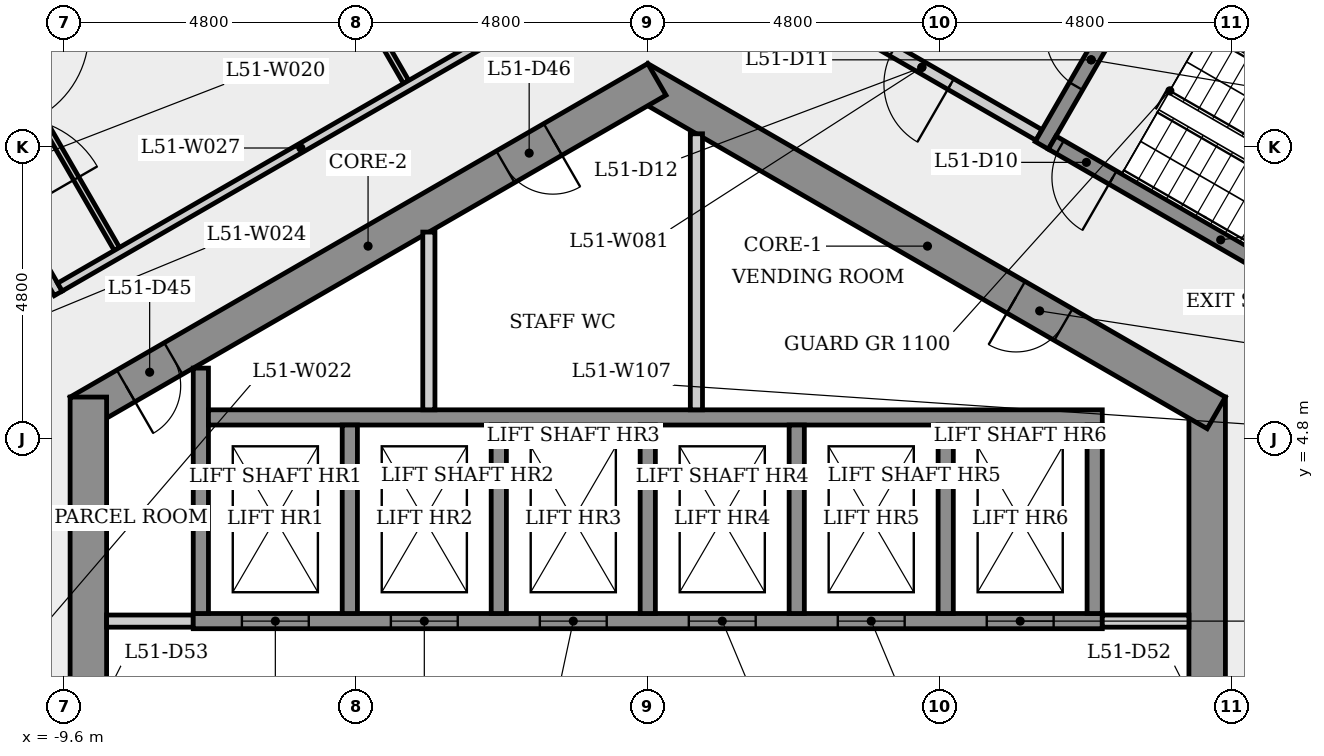
"""IFC4 building model, lengths in metres.
Left out: names, types, materials, properties, quantities, classifications, styles, units other than length and angle.
Written with IfcOpenShell. Run it as: python <this file> out.ifc"""

import sys

from ifc_helpers import new_model, si_unit, direction, frame, frame_2d, origin, place, context, subcontext, project, spatial, rectangle, extrude, element, fill, save


model = new_model("IFC4")
c1 = context("Model", 3, precision=1e-05, world=origin(), true_north=direction((0.0, 1.0)))
c2 = subcontext(c1, "Body", "Model", "MODEL_VIEW")
j1 = project(units=[si_unit("LENGTHUNIT", "METRE"), si_unit("PLANEANGLEUNIT", "RADIAN")], contexts=[c1])
p1 = place(None, origin())
s1 = spatial("IfcSite", under=j1, at=p1, CompositionType="ELEMENT")
p2 = place(p1, origin())
s2 = spatial("IfcBuilding", under=s1, at=p2, CompositionType="ELEMENT")
p3 = place(p2, frame((0.0, 0.0, 190.7)))
s3 = spatial("IfcBuildingStorey", under=s2, at=p3, CompositionType="ELEMENT", Elevation=190.7)
p4 = place(p3, frame((9.2, -5.485, 0.0), z_axis=(0.0, 0.0, 1.0), x_axis=(0.0, 1.0, 0.0)))
e1 = element("IfcWall", 1, at=p4, inside=s3, PredefinedType="SHEAR", context=c2, shape_type="SweptSolid", body=[
    extrude(rectangle(XDim=10.97, YDim=0.6, at=frame_2d((5.485, 0.0))), origin(), (0.0, 0.0, 1.0), 4.0),
])
p5 = place(p4, frame((4.685, 0.0, 0.0)))
e2 = element("IfcOpeningElement", 2, at=p5, cuts=e1, PredefinedType="OPENING", context=c2, shape_type="SweptSolid", body=[
    extrude(rectangle(XDim=1.6, YDim=2.1, at=frame_2d((0.8, 1.05))), frame((0.0, 0.31, 0.0), z_axis=(0.0, -1.0, 0.0), x_axis=(1.0, 0.0, 0.0)), (0.0, 0.0, 1.0), 0.62),
])
p6 = place(p3, frame((9.35, 5.225, 0.0), z_axis=(0.0, 0.0, 1.0), x_axis=(-0.866023993627, 0.500002442456, 0.0)))
e3 = element("IfcWall", 3, at=p6, inside=s3, PredefinedType="SHEAR", context=c2, shape_type="SweptSolid", body=[
    extrude(rectangle(XDim=10.97, YDim=0.6, at=frame_2d((5.485, 0.0))), origin(), (0.0, 0.0, 1.0), 4.0),
])
p7 = place(p6, frame((2.904, 0.0, 0.0)))
e4 = element("IfcOpeningElement", 4, at=p7, cuts=e3, PredefinedType="OPENING", context=c2, shape_type="SweptSolid", body=[
    extrude(rectangle(XDim=0.9, YDim=2.1, at=frame_2d((0.45, 1.05))), frame((0.0, 0.31, 0.0), z_axis=(0.0, -1.0, 0.0), x_axis=(1.0, 0.0, 0.0)), (0.0, 0.0, 1.0), 0.62),
])
p8 = place(p3, frame((0.15, 10.71, 0.0), z_axis=(0.0, 0.0, 1.0), x_axis=(-0.866023993627, -0.500002442456, 0.0)))
e5 = element("IfcWall", 5, at=p8, inside=s3, PredefinedType="SHEAR", context=c2, shape_type="SweptSolid", body=[
    extrude(rectangle(XDim=10.97, YDim=0.6, at=frame_2d((5.485, 0.0))), origin(), (0.0, 0.0, 1.0), 4.0),
])
p9 = place(p8, frame((9.182, 0.0, 0.0)))
e6 = element("IfcOpeningElement", 6, at=p9, cuts=e5, PredefinedType="OPENING", context=c2, shape_type="SweptSolid", body=[
    extrude(rectangle(XDim=0.9, YDim=2.1, at=frame_2d((0.45, 1.05))), frame((0.0, 0.31, 0.0), z_axis=(0.0, -1.0, 0.0), x_axis=(1.0, 0.0, 0.0)), (0.0, 0.0, 1.0), 0.62),
])
p10 = place(p8, frame((1.975, 0.0, 0.0)))
e7 = element("IfcOpeningElement", 7, at=p10, cuts=e5, PredefinedType="OPENING", context=c2, shape_type="SweptSolid", body=[
    extrude(rectangle(XDim=0.9, YDim=2.1, at=frame_2d((0.45, 1.05))), frame((0.0, 0.31, 0.0), z_axis=(0.0, -1.0, 0.0), x_axis=(1.0, 0.0, 0.0)), (0.0, 0.0, 1.0), 0.62),
])
p11 = place(p3, frame((-9.2, 5.485, 0.0), z_axis=(0.0, 0.0, 1.0), x_axis=(0.0, -1.0, 0.0)))
e8 = element("IfcWall", 8, at=p11, inside=s3, PredefinedType="SHEAR", context=c2, shape_type="SweptSolid", body=[
    extrude(rectangle(XDim=10.97, YDim=0.6, at=frame_2d((5.485, 0.0))), origin(), (0.0, 0.0, 1.0), 4.0),
])
p12 = place(p11, frame((8.516, 0.0, 0.0)))
e9 = element("IfcOpeningElement", 9, at=p12, cuts=e8, PredefinedType="OPENING", context=c2, shape_type="SweptSolid", body=[
    extrude(rectangle(XDim=0.9, YDim=2.1, at=frame_2d((0.45, 1.05))), frame((0.0, 0.31, 0.0), z_axis=(0.0, -1.0, 0.0), x_axis=(1.0, 0.0, 0.0)), (0.0, 0.0, 1.0), 0.62),
])
p13 = place(p11, frame((4.685, 0.0, 0.0)))
e10 = element("IfcOpeningElement", 10, at=p13, cuts=e8, PredefinedType="OPENING", context=c2, shape_type="SweptSolid", body=[
    extrude(rectangle(XDim=1.6, YDim=2.1, at=frame_2d((0.8, 1.05))), frame((0.0, 0.31, 0.0), z_axis=(0.0, -1.0, 0.0), x_axis=(1.0, 0.0, 0.0)), (0.0, 0.0, 1.0), 0.62),
])
p14 = place(p3, frame((-20.11, 27.629, 0.0), z_axis=(0.0, 0.0, 1.0), x_axis=(0.499998569178, -0.866026229868, 0.0)))
e11 = element("IfcWall", 11, at=p14, inside=s3, PredefinedType="PARTITIONING", context=c2, shape_type="SweptSolid", body=[
    extrude(rectangle(XDim=22.757, YDim=0.1, at=frame_2d((11.379, 0.0))), origin(), (0.0, 0.0, 1.0), 3.6),
])
p15 = place(p14, frame((18.635, 0.0, 0.0)))
e12 = element("IfcOpeningElement", 12, at=p15, cuts=e11, PredefinedType="OPENING", context=c2, shape_type="SweptSolid", body=[
    extrude(rectangle(XDim=1.6, YDim=2.1, at=frame_2d((0.8, 1.05))), frame((0.0, 0.06, 0.0), z_axis=(0.0, -1.0, 0.0), x_axis=(1.0, 0.0, 0.0)), (0.0, 0.0, 1.0), 0.12),
])
p16 = place(p14, frame((3.535, 0.0, 0.0)))
e13 = element("IfcOpeningElement", 13, at=p16, cuts=e11, PredefinedType="OPENING", context=c2, shape_type="SweptSolid", body=[
    extrude(rectangle(XDim=1.6, YDim=2.1, at=frame_2d((0.8, 1.05))), frame((0.0, 0.06, 0.0), z_axis=(0.0, -1.0, 0.0), x_axis=(1.0, 0.0, 0.0)), (0.0, 0.0, 1.0), 0.12),
])
p17 = place(p3, frame((-11.945, 11.087, 0.0), z_axis=(0.0, 0.0, 1.0), x_axis=(0.499962028372, -0.866047325604, 0.0)))
e14 = element("IfcWall", 14, at=p17, inside=s3, PredefinedType="PARTITIONING", context=c2, shape_type="SweptSolid", body=[
    extrude(rectangle(XDim=4.499, YDim=0.15, at=frame_2d((2.25, 0.0))), origin(), (0.0, 0.0, 1.0), 3.6),
])
p18 = place(p17, frame((1.412, 0.0, 0.0)))
e15 = element("IfcOpeningElement", 15, at=p18, cuts=e14, PredefinedType="OPENING", context=c2, shape_type="SweptSolid", body=[
    extrude(rectangle(XDim=1.6, YDim=2.1, at=frame_2d((0.8, 1.05))), frame((0.0, 0.085, 0.0), z_axis=(0.0, -1.0, 0.0), x_axis=(1.0, 0.0, 0.0)), (0.0, 0.0, 1.0), 0.17),
])
p19 = place(p3, frame((-15.353, 30.375, 0.0), z_axis=(0.0, 0.0, 1.0), x_axis=(0.499998569178, -0.866026229868, 0.0)))
e16 = element("IfcWall", 16, at=p19, inside=s3, PredefinedType="PARTITIONING", context=c2, shape_type="SweptSolid", body=[
    extrude(rectangle(XDim=22.757, YDim=0.1, at=frame_2d((11.379, 0.0))), origin(), (0.0, 0.0, 1.0), 3.6),
])
p20 = place(p19, frame((11.219, 0.0, 0.0)))
e17 = element("IfcOpeningElement", 17, at=p20, cuts=e16, PredefinedType="OPENING", context=c2, shape_type="SweptSolid", body=[
    extrude(rectangle(XDim=1.6, YDim=2.1, at=frame_2d((0.8, 1.05))), frame((0.0, 0.06, 0.0), z_axis=(0.0, -1.0, 0.0), x_axis=(1.0, 0.0, 0.0)), (0.0, 0.0, 1.0), 0.12),
])
p21 = place(p3, frame((-9.668, 7.293, 0.0), z_axis=(0.0, 0.0, 1.0), x_axis=(0.866028335764, 0.499994921628, 0.0)))
e18 = element("IfcWall", 18, at=p21, inside=s3, PredefinedType="PARTITIONING", context=c2, shape_type="SweptSolid", body=[
    extrude(rectangle(XDim=9.152, YDim=0.15, at=frame_2d((4.576, 0.0))), origin(), (0.0, 0.0, 1.0), 3.6),
])
p22 = place(p3, frame((-8.9, 1.8, 0.0), z_axis=(0.0, 0.0, 1.0), x_axis=(1.0, 0.0, 0.0)))
e19 = element("IfcWall", 19, at=p22, inside=s3, PredefinedType="PARTITIONING", context=c2, shape_type="SweptSolid", body=[
    extrude(rectangle(XDim=1.425, YDim=0.2, at=frame_2d((0.712, 0.0))), origin(), (0.0, 0.0, 1.0), 3.6),
])
p23 = place(p3, frame((-7.475, 1.8, 0.0), z_axis=(0.0, 0.0, 1.0), x_axis=(1.0, 0.0, 0.0)))
e20 = element("IfcWall", 20, at=p23, inside=s3, PredefinedType="SHEAR", context=c2, shape_type="SweptSolid", body=[
    extrude(rectangle(XDim=14.95, YDim=0.25, at=frame_2d((7.475, 0.0))), origin(), (0.0, 0.0, 1.0), 3.6),
])
p24 = place(p23, frame((0.8, 0.0, 0.0)))
e21 = element("IfcOpeningElement", 21, at=p24, cuts=e20, PredefinedType="OPENING", context=c2, shape_type="SweptSolid", body=[
    extrude(rectangle(XDim=1.1, YDim=2.1, at=frame_2d((0.55, 1.05))), frame((0.0, 0.135, 0.0), z_axis=(0.0, -1.0, 0.0), x_axis=(1.0, 0.0, 0.0)), (0.0, 0.0, 1.0), 0.27),
])
p25 = place(p23, frame((3.25, 0.0, 0.0)))
e22 = element("IfcOpeningElement", 22, at=p25, cuts=e20, PredefinedType="OPENING", context=c2, shape_type="SweptSolid", body=[
    extrude(rectangle(XDim=1.1, YDim=2.1, at=frame_2d((0.55, 1.05))), frame((0.0, 0.135, 0.0), z_axis=(0.0, -1.0, 0.0), x_axis=(1.0, 0.0, 0.0)), (0.0, 0.0, 1.0), 0.27),
])
p26 = place(p23, frame((5.7, 0.0, 0.0)))
e23 = element("IfcOpeningElement", 23, at=p26, cuts=e20, PredefinedType="OPENING", context=c2, shape_type="SweptSolid", body=[
    extrude(rectangle(XDim=1.1, YDim=2.1, at=frame_2d((0.55, 1.05))), frame((0.0, 0.135, 0.0), z_axis=(0.0, -1.0, 0.0), x_axis=(1.0, 0.0, 0.0)), (0.0, 0.0, 1.0), 0.27),
])
p27 = place(p23, frame((8.15, 0.0, 0.0)))
e24 = element("IfcOpeningElement", 24, at=p27, cuts=e20, PredefinedType="OPENING", context=c2, shape_type="SweptSolid", body=[
    extrude(rectangle(XDim=1.1, YDim=2.1, at=frame_2d((0.55, 1.05))), frame((0.0, 0.135, 0.0), z_axis=(0.0, -1.0, 0.0), x_axis=(1.0, 0.0, 0.0)), (0.0, 0.0, 1.0), 0.27),
])
p28 = place(p23, frame((10.6, 0.0, 0.0)))
e25 = element("IfcOpeningElement", 25, at=p28, cuts=e20, PredefinedType="OPENING", context=c2, shape_type="SweptSolid", body=[
    extrude(rectangle(XDim=1.1, YDim=2.1, at=frame_2d((0.55, 1.05))), frame((0.0, 0.135, 0.0), z_axis=(0.0, -1.0, 0.0), x_axis=(1.0, 0.0, 0.0)), (0.0, 0.0, 1.0), 0.27),
])
p29 = place(p23, frame((13.05, 0.0, 0.0)))
e26 = element("IfcOpeningElement", 26, at=p29, cuts=e20, PredefinedType="OPENING", context=c2, shape_type="SweptSolid", body=[
    extrude(rectangle(XDim=1.1, YDim=2.1, at=frame_2d((0.55, 1.05))), frame((0.0, 0.135, 0.0), z_axis=(0.0, -1.0, 0.0), x_axis=(1.0, 0.0, 0.0)), (0.0, 0.0, 1.0), 0.27),
])
p30 = place(p3, frame((-7.35, 1.925, 0.0), z_axis=(0.0, 0.0, 1.0), x_axis=(0.0, 1.0, 0.0)))
e27 = element("IfcWall", 27, at=p30, inside=s3, PredefinedType="SHEAR", context=c2, shape_type="SweptSolid", body=[
    extrude(rectangle(XDim=4.036, YDim=0.25, at=frame_2d((2.018, 0.0))), origin(), (0.0, 0.0, 1.0), 3.6),
])
p31 = place(p3, frame((-7.225, 5.15, 0.0), z_axis=(0.0, 0.0, 1.0), x_axis=(1.0, 0.0, 0.0)))
e28 = element("IfcWall", 28, at=p31, inside=s3, PredefinedType="SHEAR", context=c2, shape_type="SweptSolid", body=[
    extrude(rectangle(XDim=14.7, YDim=0.25, at=frame_2d((7.35, 0.0))), origin(), (0.0, 0.0, 1.0), 3.6),
])
p32 = place(p3, frame((-4.9, 5.025, 0.0), z_axis=(0.0, 0.0, 1.0), x_axis=(0.0, -1.0, 0.0)))
e29 = element("IfcWall", 29, at=p32, inside=s3, PredefinedType="SHEAR", context=c2, shape_type="SweptSolid", body=[
    extrude(rectangle(XDim=3.1, YDim=0.25, at=frame_2d((1.55, 0.0))), origin(), (0.0, 0.0, 1.0), 4.0),
])
p33 = place(p3, frame((-3.6, 8.198, 0.0), z_axis=(0.0, 0.0, 1.0), x_axis=(0.0, -1.0, 0.0)))
e30 = element("IfcWall", 30, at=p33, inside=s3, PredefinedType="PARTITIONING", context=c2, shape_type="SweptSolid", body=[
    extrude(rectangle(XDim=2.924, YDim=0.2, at=frame_2d((1.462, 0.0))), origin(), (0.0, 0.0, 1.0), 3.6),
])
for number, where, z_axis, x_axis in (
    (31, (-2.45, 5.025, 0.0), (0.0, 0.0, 1.0), (0.0, -1.0, 0.0)),
    (32, (0.0, 5.025, 0.0), (0.0, 0.0, 1.0), (0.0, -1.0, 0.0)),
):
    element("IfcWall", number, at=place(p3, frame(where, z_axis=z_axis, x_axis=x_axis)), inside=s3, PredefinedType="SHEAR", context=c2, shape_type="SweptSolid", body=[
        extrude(rectangle(XDim=3.1, YDim=0.25, at=frame_2d((1.55, 0.0))), origin(), (0.0, 0.0, 1.0), 4.0),
    ])
p34 = place(p3, frame((0.8, 9.815, 0.0), z_axis=(0.0, 0.0, 1.0), x_axis=(0.0, -1.0, 0.0)))
e33 = element("IfcWall", 33, at=p34, inside=s3, PredefinedType="PARTITIONING", context=c2, shape_type="SweptSolid", body=[
    extrude(rectangle(XDim=4.54, YDim=0.2, at=frame_2d((2.27, 0.0))), origin(), (0.0, 0.0, 1.0), 3.6),
])
for number, where, z_axis, x_axis in (
    (34, (2.45, 5.025, 0.0), (0.0, 0.0, 1.0), (0.0, -1.0, 0.0)),
    (35, (4.9, 5.025, 0.0), (0.0, 0.0, 1.0), (0.0, -1.0, 0.0)),
):
    element("IfcWall", number, at=place(p3, frame(where, z_axis=z_axis, x_axis=x_axis)), inside=s3, PredefinedType="SHEAR", context=c2, shape_type="SweptSolid", body=[
        extrude(rectangle(XDim=3.1, YDim=0.25, at=frame_2d((1.55, 0.0))), origin(), (0.0, 0.0, 1.0), 4.0),
    ])
p35 = place(p3, frame((6.435, 9.795, 0.0), z_axis=(0.0, 0.0, 1.0), x_axis=(-0.866012907634, 0.500021643343, 0.0)))
e36 = element("IfcWall", 36, at=p35, inside=s3, PredefinedType="PARTITIONING", context=c2, shape_type="SweptSolid", body=[
    extrude(rectangle(XDim=4.45, YDim=0.2, at=frame_2d((2.225, 0.0))), origin(), (0.0, 0.0, 1.0), 3.6),
])
p36 = place(p35, frame((1.675, 0.0, 0.0)))
e37 = element("IfcOpeningElement", 37, at=p36, cuts=e36, PredefinedType="OPENING", context=c2, shape_type="SweptSolid", body=[
    extrude(rectangle(XDim=1.1, YDim=2.1, at=frame_2d((0.55, 1.05))), frame((0.0, 0.11, 0.0), z_axis=(0.0, -1.0, 0.0), x_axis=(1.0, 0.0, 0.0)), (0.0, 0.0, 1.0), 0.22),
])
p37 = place(p3, frame((6.48, 9.624, 0.0), z_axis=(0.0, 0.0, 1.0), x_axis=(0.500017246033, 0.866015446554, 0.0)))
e38 = element("IfcWall", 38, at=p37, inside=s3, PredefinedType="SHEAR", context=c2, shape_type="SweptSolid", body=[
    extrude(rectangle(XDim=3.25, YDim=0.25, at=frame_2d((1.625, 0.0))), origin(), (0.0, 0.0, 1.0), 3.6),
])
p38 = place(p37, frame((1.125, 0.0, 0.0)))
e39 = element("IfcOpeningElement", 39, at=p38, cuts=e38, PredefinedType="OPENING", context=c2, shape_type="SweptSolid", body=[
    extrude(rectangle(XDim=1.0, YDim=2.1, at=frame_2d((0.5, 1.05))), frame((0.0, 0.135, 0.0), z_axis=(0.0, -1.0, 0.0), x_axis=(1.0, 0.0, 0.0)), (0.0, 0.0, 1.0), 0.27),
])
p39 = place(p3, frame((7.475, 1.8, 0.0), z_axis=(0.0, 0.0, 1.0), x_axis=(1.0, 0.0, 0.0)))
e40 = element("IfcWall", 40, at=p39, inside=s3, PredefinedType="PARTITIONING", context=c2, shape_type="SweptSolid", body=[
    extrude(rectangle(XDim=1.425, YDim=0.2, at=frame_2d((0.712, 0.0))), origin(), (0.0, 0.0, 1.0), 3.6),
])
p40 = place(p3, frame((7.35, 5.025, 0.0), z_axis=(0.0, 0.0, 1.0), x_axis=(0.0, -1.0, 0.0)))
e41 = element("IfcWall", 41, at=p40, inside=s3, PredefinedType="SHEAR", context=c2, shape_type="SweptSolid", body=[
    extrude(rectangle(XDim=3.1, YDim=0.25, at=frame_2d((1.55, 0.0))), origin(), (0.0, 0.0, 1.0), 4.0),
])
p41 = place(p3, frame((8.151, 12.268, 0.0), z_axis=(0.0, 0.0, 1.0), x_axis=(0.866025499775, -0.499999833739, 0.0)))
e42 = element("IfcWall", 42, at=p41, inside=s3, PredefinedType="SHEAR", context=c2, shape_type="SweptSolid", body=[
    extrude(rectangle(XDim=6.4, YDim=0.25, at=frame_2d((3.2, 0.0))), origin(), (0.0, 0.0, 1.0), 3.6),
])
p42 = place(p3, frame((12.194, 6.47, 0.0), z_axis=(0.0, 0.0, 1.0), x_axis=(-0.866025499775, 0.499999833739, 0.0)))
e43 = element("IfcWall", 43, at=p42, inside=s3, PredefinedType="SHEAR", context=c2, shape_type="SweptSolid", body=[
    extrude(rectangle(XDim=6.4, YDim=0.25, at=frame_2d((3.2, 0.0))), origin(), (0.0, 0.0, 1.0), 3.6),
])
p43 = place(p42, frame((5.25, 0.0, 0.0)))
e44 = element("IfcOpeningElement", 44, at=p43, cuts=e43, PredefinedType="OPENING", context=c2, shape_type="SweptSolid", body=[
    extrude(rectangle(XDim=1.0, YDim=2.1, at=frame_2d((0.5, 1.05))), frame((0.0, 0.135, 0.0), z_axis=(0.0, -1.0, 0.0), x_axis=(1.0, 0.0, 0.0)), (0.0, 0.0, 1.0), 0.27),
])
p44 = place(p24, origin())
e45 = element("IfcDoor", 45, at=p44, inside=s3, OperationType="SLIDING_TO_LEFT", PredefinedType="DOOR", context=c2, shape_type="SweptSolid", body=[
    extrude(rectangle(XDim=1.1, YDim=2.1, at=frame_2d((0.55, 1.05))), frame((0.0, 0.025, 0.0), z_axis=(0.0, -1.0, 0.0), x_axis=(1.0, 0.0, 0.0)), (0.0, 0.0, 1.0), 0.05),
])
fill(e21, e45)
p45 = place(p25, origin())
e46 = element("IfcDoor", 46, at=p45, inside=s3, OperationType="SLIDING_TO_LEFT", PredefinedType="DOOR", context=c2, shape_type="SweptSolid", body=[
    extrude(rectangle(XDim=1.1, YDim=2.1, at=frame_2d((0.55, 1.05))), frame((0.0, 0.025, 0.0), z_axis=(0.0, -1.0, 0.0), x_axis=(1.0, 0.0, 0.0)), (0.0, 0.0, 1.0), 0.05),
])
fill(e22, e46)
p46 = place(p26, origin())
e47 = element("IfcDoor", 47, at=p46, inside=s3, OperationType="SLIDING_TO_LEFT", PredefinedType="DOOR", context=c2, shape_type="SweptSolid", body=[
    extrude(rectangle(XDim=1.1, YDim=2.1, at=frame_2d((0.55, 1.05))), frame((0.0, 0.025, 0.0), z_axis=(0.0, -1.0, 0.0), x_axis=(1.0, 0.0, 0.0)), (0.0, 0.0, 1.0), 0.05),
])
fill(e23, e47)
p47 = place(p27, origin())
e48 = element("IfcDoor", 48, at=p47, inside=s3, OperationType="SLIDING_TO_LEFT", PredefinedType="DOOR", context=c2, shape_type="SweptSolid", body=[
    extrude(rectangle(XDim=1.1, YDim=2.1, at=frame_2d((0.55, 1.05))), frame((0.0, 0.025, 0.0), z_axis=(0.0, -1.0, 0.0), x_axis=(1.0, 0.0, 0.0)), (0.0, 0.0, 1.0), 0.05),
])
fill(e24, e48)
p48 = place(p28, origin())
e49 = element("IfcDoor", 49, at=p48, inside=s3, OperationType="SLIDING_TO_LEFT", PredefinedType="DOOR", context=c2, shape_type="SweptSolid", body=[
    extrude(rectangle(XDim=1.1, YDim=2.1, at=frame_2d((0.55, 1.05))), frame((0.0, 0.025, 0.0), z_axis=(0.0, -1.0, 0.0), x_axis=(1.0, 0.0, 0.0)), (0.0, 0.0, 1.0), 0.05),
])
fill(e25, e49)
p49 = place(p29, origin())
e50 = element("IfcDoor", 50, at=p49, inside=s3, OperationType="SLIDING_TO_LEFT", PredefinedType="DOOR", context=c2, shape_type="SweptSolid", body=[
    extrude(rectangle(XDim=1.1, YDim=2.1, at=frame_2d((0.55, 1.05))), frame((0.0, 0.025, 0.0), z_axis=(0.0, -1.0, 0.0), x_axis=(1.0, 0.0, 0.0)), (0.0, 0.0, 1.0), 0.05),
])
fill(e26, e50)
p50 = place(p43, origin())
e51 = element("IfcDoor", 51, at=p50, inside=s3, OperationType="SINGLE_SWING_LEFT", PredefinedType="DOOR", context=c2, shape_type="SweptSolid", body=[
    extrude(rectangle(XDim=1.0, YDim=2.1, at=frame_2d((0.5, 1.05))), frame((0.0, 0.025, 0.0), z_axis=(0.0, -1.0, 0.0), x_axis=(1.0, 0.0, 0.0)), (0.0, 0.0, 1.0), 0.05),
])
fill(e44, e51)
p51 = place(p38, origin())
e52 = element("IfcDoor", 52, at=p51, inside=s3, OperationType="SINGLE_SWING_RIGHT", PredefinedType="DOOR", context=c2, shape_type="SweptSolid", body=[
    extrude(rectangle(XDim=1.0, YDim=2.1, at=frame_2d((0.5, 1.05))), frame((0.0, 0.025, 0.0), z_axis=(0.0, -1.0, 0.0), x_axis=(1.0, 0.0, 0.0)), (0.0, 0.0, 1.0), 0.05),
])
fill(e39, e52)
p52 = place(p36, origin())
e53 = element("IfcDoor", 53, at=p52, inside=s3, OperationType="SINGLE_SWING_LEFT", PredefinedType="DOOR", context=c2, shape_type="SweptSolid", body=[
    extrude(rectangle(XDim=1.1, YDim=2.1, at=frame_2d((0.55, 1.05))), frame((0.0, 0.025, 0.0), z_axis=(0.0, -1.0, 0.0), x_axis=(1.0, 0.0, 0.0)), (0.0, 0.0, 1.0), 0.05),
])
fill(e37, e53)
p53 = place(p9, origin())
e54 = element("IfcDoor", 54, at=p53, inside=s3, OperationType="SINGLE_SWING_RIGHT", PredefinedType="DOOR", context=c2, shape_type="SweptSolid", body=[
    extrude(rectangle(XDim=0.9, YDim=2.1, at=frame_2d((0.45, 1.05))), frame((0.0, 0.025, 0.0), z_axis=(0.0, -1.0, 0.0), x_axis=(1.0, 0.0, 0.0)), (0.0, 0.0, 1.0), 0.05),
])
fill(e6, e54)
p54 = place(p10, origin())
e55 = element("IfcDoor", 55, at=p54, inside=s3, OperationType="SINGLE_SWING_LEFT", PredefinedType="DOOR", context=c2, shape_type="SweptSolid", body=[
    extrude(rectangle(XDim=0.9, YDim=2.1, at=frame_2d((0.45, 1.05))), frame((0.0, 0.025, 0.0), z_axis=(0.0, -1.0, 0.0), x_axis=(1.0, 0.0, 0.0)), (0.0, 0.0, 1.0), 0.05),
])
fill(e7, e55)
p55 = place(p7, origin())
e56 = element("IfcDoor", 56, at=p55, inside=s3, OperationType="SINGLE_SWING_RIGHT", PredefinedType="DOOR", context=c2, shape_type="SweptSolid", body=[
    extrude(rectangle(XDim=0.9, YDim=2.1, at=frame_2d((0.45, 1.05))), frame((0.0, 0.025, 0.0), z_axis=(0.0, -1.0, 0.0), x_axis=(1.0, 0.0, 0.0)), (0.0, 0.0, 1.0), 0.05),
])
fill(e4, e56)
save(model, sys.argv[1])
